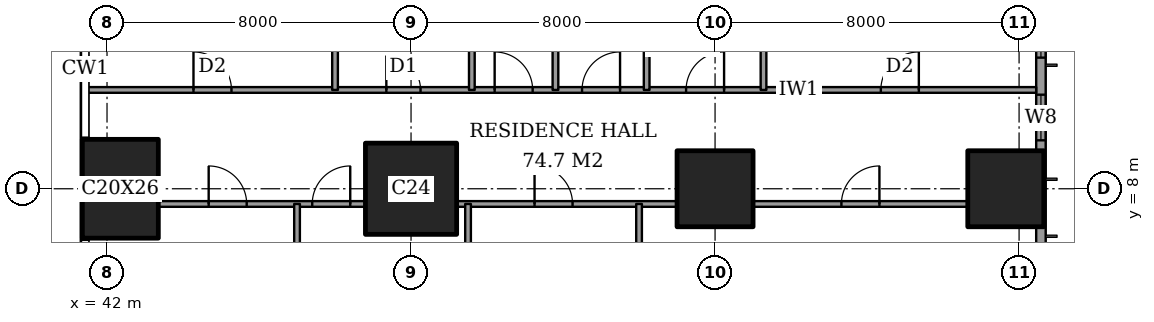
"""IFC4 building model, lengths in metres.
Left out: names, types, materials, properties, quantities, classifications, styles, units other than length and angle.
Written with IfcOpenShell. Run it as: python <this file> out.ifc"""

import sys

from ifc_helpers import new_model, si_unit, direction, frame, frame_2d, origin, origin_2d, place, context, subcontext, project, spatial, rectangle, extrude, element, fill, save


model = new_model("IFC4")
c1 = context("Model", 3, precision=1e-05, world=origin(), true_north=direction((0.0, 1.0)))
c2 = subcontext(c1, "Body", "Model", "MODEL_VIEW")
j1 = project(units=[si_unit("LENGTHUNIT", "METRE"), si_unit("PLANEANGLEUNIT", "RADIAN")], contexts=[c1])
p1 = place(None, origin())
s1 = spatial("IfcSite", under=j1, at=p1, CompositionType="ELEMENT")
p2 = place(p1, origin())
s2 = spatial("IfcBuilding", under=s1, at=p2, CompositionType="ELEMENT")
p3 = place(p2, frame((0.0, 0.0, 40.4)))
s3 = spatial("IfcBuildingStorey", under=s2, at=p3, CompositionType="ELEMENT", Elevation=40.4)
p4 = place(p3, frame((42.35, 8.0, 0.0), z_axis=(0.0, 0.0, 1.0), x_axis=(1.0, 0.0, 0.0)))
e1 = element("IfcColumn", 1, at=p4, inside=s3, PredefinedType="COLUMN", context=c2, shape_type="SweptSolid", body=[
    extrude(rectangle(XDim=2.0, YDim=2.6, at=origin_2d()), origin(), (0.0, 0.0, 1.0), 3.6),
])
p5 = place(p3, frame((50.0, 8.0, 0.0), z_axis=(0.0, 0.0, 1.0), x_axis=(1.0, 0.0, 0.0)))
e2 = element("IfcColumn", 2, at=p5, inside=s3, PredefinedType="COLUMN", context=c2, shape_type="SweptSolid", body=[
    extrude(rectangle(XDim=2.4, YDim=2.4, at=origin_2d()), origin(), (0.0, 0.0, 1.0), 3.6),
])
for number, where, z_axis, x_axis in (
    (3, (58.0, 8.0, 0.0), (0.0, 0.0, 1.0), (1.0, 0.0, 0.0)),
    (4, (65.65, 8.0, 0.0), (0.0, 0.0, 1.0), (1.0, 0.0, 0.0)),
):
    element("IfcColumn", number, at=place(p3, frame(where, z_axis=z_axis, x_axis=x_axis)), inside=s3, PredefinedType="COLUMN", context=c2, shape_type="SweptSolid", body=[
        extrude(rectangle(XDim=2.0, YDim=2.0, at=origin_2d()), origin(), (0.0, 0.0, 1.0), 3.6),
    ])
p6 = place(p3, frame((66.575, 3.175, 0.0), z_axis=(0.0, 0.0, 1.0), x_axis=(0.0, 1.0, 0.0)))
e5 = element("IfcWall", 5, at=p6, inside=s3, PredefinedType="SOLIDWALL", context=c2, shape_type="SweptSolid", body=[
    extrude(rectangle(XDim=41.65, YDim=0.25, at=frame_2d((20.825, 0.0))), origin(), (0.0, 0.0, 1.0), 3.6),
])
p7 = place(p6, frame((0.775, 0.0, 0.6)))
e6 = element("IfcOpeningElement", 6, at=p7, cuts=e5, PredefinedType="OPENING", context=c2, shape_type="SweptSolid", body=[
    extrude(rectangle(XDim=2.4, YDim=2.0, at=frame_2d((1.2, 1.0))), frame((0.0, 0.135, 0.0), z_axis=(0.0, -1.0, 0.0), x_axis=(1.0, 0.0, 0.0)), (0.0, 0.0, 1.0), 0.27),
])
p8 = place(p6, frame((6.1, 0.0, 0.6)))
e7 = element("IfcOpeningElement", 7, at=p8, cuts=e5, PredefinedType="OPENING", context=c2, shape_type="SweptSolid", body=[
    extrude(rectangle(XDim=1.2, YDim=2.0, at=frame_2d((0.6, 1.0))), frame((0.0, 0.135, 0.0), z_axis=(0.0, -1.0, 0.0), x_axis=(1.0, 0.0, 0.0)), (0.0, 0.0, 1.0), 0.27),
])
p9 = place(p6, frame((8.275, 0.0, 0.6)))
e8 = element("IfcOpeningElement", 8, at=p9, cuts=e5, PredefinedType="OPENING", context=c2, shape_type="SweptSolid", body=[
    extrude(rectangle(XDim=2.4, YDim=2.0, at=frame_2d((1.2, 1.0))), frame((0.0, 0.135, 0.0), z_axis=(0.0, -1.0, 0.0), x_axis=(1.0, 0.0, 0.0)), (0.0, 0.0, 1.0), 0.27),
])
p10 = place(p6, frame((15.775, 0.0, 0.6)))
e9 = element("IfcOpeningElement", 9, at=p10, cuts=e5, PredefinedType="OPENING", context=c2, shape_type="SweptSolid", body=[
    extrude(rectangle(XDim=2.4, YDim=2.0, at=frame_2d((1.2, 1.0))), frame((0.0, 0.135, 0.0), z_axis=(0.0, -1.0, 0.0), x_axis=(1.0, 0.0, 0.0)), (0.0, 0.0, 1.0), 0.27),
])
p11 = place(p6, frame((23.475, 0.0, 0.6)))
e10 = element("IfcOpeningElement", 10, at=p11, cuts=e5, PredefinedType="OPENING", context=c2, shape_type="SweptSolid", body=[
    extrude(rectangle(XDim=2.4, YDim=2.0, at=frame_2d((1.2, 1.0))), frame((0.0, 0.135, 0.0), z_axis=(0.0, -1.0, 0.0), x_axis=(1.0, 0.0, 0.0)), (0.0, 0.0, 1.0), 0.27),
])
p12 = place(p6, frame((30.975, 0.0, 0.6)))
e11 = element("IfcOpeningElement", 11, at=p12, cuts=e5, PredefinedType="OPENING", context=c2, shape_type="SweptSolid", body=[
    extrude(rectangle(XDim=2.4, YDim=2.0, at=frame_2d((1.2, 1.0))), frame((0.0, 0.135, 0.0), z_axis=(0.0, -1.0, 0.0), x_axis=(1.0, 0.0, 0.0)), (0.0, 0.0, 1.0), 0.27),
])
p13 = place(p6, frame((34.5, 0.0, 0.6)))
e12 = element("IfcOpeningElement", 12, at=p13, cuts=e5, PredefinedType="OPENING", context=c2, shape_type="SweptSolid", body=[
    extrude(rectangle(XDim=1.2, YDim=2.0, at=frame_2d((0.6, 1.0))), frame((0.0, 0.135, 0.0), z_axis=(0.0, -1.0, 0.0), x_axis=(1.0, 0.0, 0.0)), (0.0, 0.0, 1.0), 0.27),
])
p14 = place(p6, frame((38.475, 0.0, 0.6)))
e13 = element("IfcOpeningElement", 13, at=p14, cuts=e5, PredefinedType="OPENING", context=c2, shape_type="SweptSolid", body=[
    extrude(rectangle(XDim=2.4, YDim=2.0, at=frame_2d((1.2, 1.0))), frame((0.0, 0.135, 0.0), z_axis=(0.0, -1.0, 0.0), x_axis=(1.0, 0.0, 0.0)), (0.0, 0.0, 1.0), 0.27),
])
p15 = place(p3, frame((43.35, 7.6, 0.0), z_axis=(0.0, 0.0, 1.0), x_axis=(1.0, 0.0, 0.0)))
e14 = element("IfcWall", 14, at=p15, inside=s3, PredefinedType="PARTITIONING", context=c2, shape_type="SweptSolid", body=[
    extrude(rectangle(XDim=5.45, YDim=0.15, at=frame_2d((2.725, 0.0))), origin(), (0.0, 0.0, 1.0), 3.35),
])
p16 = place(p15, frame((4.05, 0.0, 0.0)))
e15 = element("IfcOpeningElement", 15, at=p16, cuts=e14, PredefinedType="OPENING", context=c2, shape_type="SweptSolid", body=[
    extrude(rectangle(XDim=1.0, YDim=2.1, at=frame_2d((0.5, 1.05))), frame((0.0, 0.085, 0.0), z_axis=(0.0, -1.0, 0.0), x_axis=(1.0, 0.0, 0.0)), (0.0, 0.0, 1.0), 0.17),
])
p17 = place(p15, frame((1.325, 0.0, 0.0)))
e16 = element("IfcOpeningElement", 16, at=p17, cuts=e14, PredefinedType="OPENING", context=c2, shape_type="SweptSolid", body=[
    extrude(rectangle(XDim=1.0, YDim=2.1, at=frame_2d((0.5, 1.05))), frame((0.0, 0.085, 0.0), z_axis=(0.0, -1.0, 0.0), x_axis=(1.0, 0.0, 0.0)), (0.0, 0.0, 1.0), 0.17),
])
p18 = place(p3, frame((51.2, 7.6, 0.0), z_axis=(0.0, 0.0, 1.0), x_axis=(1.0, 0.0, 0.0)))
e17 = element("IfcWall", 17, at=p18, inside=s3, PredefinedType="PARTITIONING", context=c2, shape_type="SweptSolid", body=[
    extrude(rectangle(XDim=5.8, YDim=0.15, at=frame_2d((2.9, 0.0))), origin(), (0.0, 0.0, 1.0), 3.35),
])
p19 = place(p18, frame((2.05, 0.0, 0.0)))
e18 = element("IfcOpeningElement", 18, at=p19, cuts=e17, PredefinedType="OPENING", context=c2, shape_type="SweptSolid", body=[
    extrude(rectangle(XDim=1.0, YDim=2.1, at=frame_2d((0.5, 1.05))), frame((0.0, 0.085, 0.0), z_axis=(0.0, -1.0, 0.0), x_axis=(1.0, 0.0, 0.0)), (0.0, 0.0, 1.0), 0.17),
])
p20 = place(p3, frame((59.0, 7.6, 0.0), z_axis=(0.0, 0.0, 1.0), x_axis=(1.0, 0.0, 0.0)))
e19 = element("IfcWall", 19, at=p20, inside=s3, PredefinedType="PARTITIONING", context=c2, shape_type="SweptSolid", body=[
    extrude(rectangle(XDim=5.65, YDim=0.15, at=frame_2d((2.825, 0.0))), origin(), (0.0, 0.0, 1.0), 3.35),
])
p21 = place(p20, frame((2.325, 0.0, 0.0)))
e20 = element("IfcOpeningElement", 20, at=p21, cuts=e19, PredefinedType="OPENING", context=c2, shape_type="SweptSolid", body=[
    extrude(rectangle(XDim=1.0, YDim=2.1, at=frame_2d((0.5, 1.05))), frame((0.0, 0.085, 0.0), z_axis=(0.0, -1.0, 0.0), x_axis=(1.0, 0.0, 0.0)), (0.0, 0.0, 1.0), 0.17),
])
p22 = place(p3, frame((41.439, 10.6, 0.0), z_axis=(0.0, 0.0, 1.0), x_axis=(1.0, 0.0, 0.0)))
e21 = element("IfcWall", 21, at=p22, inside=s3, PredefinedType="PARTITIONING", context=c2, shape_type="SweptSolid", body=[
    extrude(rectangle(XDim=25.011, YDim=0.15, at=frame_2d((12.505, 0.0))), origin(), (0.0, 0.0, 1.0), 3.35),
])
p23 = place(p22, frame((10.761, 0.0, 0.0)))
e22 = element("IfcOpeningElement", 22, at=p23, cuts=e21, PredefinedType="OPENING", context=c2, shape_type="SweptSolid", body=[
    extrude(rectangle(XDim=1.0, YDim=2.1, at=frame_2d((0.5, 1.05))), frame((0.0, 0.085, 0.0), z_axis=(0.0, -1.0, 0.0), x_axis=(1.0, 0.0, 0.0)), (0.0, 0.0, 1.0), 0.17),
])
p24 = place(p22, frame((20.924, 0.0, 0.0)))
e23 = element("IfcOpeningElement", 23, at=p24, cuts=e21, PredefinedType="OPENING", context=c2, shape_type="SweptSolid", body=[
    extrude(rectangle(XDim=1.0, YDim=2.1, at=frame_2d((0.5, 1.05))), frame((0.0, 0.085, 0.0), z_axis=(0.0, -1.0, 0.0), x_axis=(1.0, 0.0, 0.0)), (0.0, 0.0, 1.0), 0.17),
])
p25 = place(p22, frame((15.799, 0.0, 0.0)))
e24 = element("IfcOpeningElement", 24, at=p25, cuts=e21, PredefinedType="OPENING", context=c2, shape_type="SweptSolid", body=[
    extrude(rectangle(XDim=1.0, YDim=2.1, at=frame_2d((0.5, 1.05))), frame((0.0, 0.085, 0.0), z_axis=(0.0, -1.0, 0.0), x_axis=(1.0, 0.0, 0.0)), (0.0, 0.0, 1.0), 0.17),
])
p26 = place(p22, frame((13.061, 0.0, 0.0)))
e25 = element("IfcOpeningElement", 25, at=p26, cuts=e21, PredefinedType="OPENING", context=c2, shape_type="SweptSolid", body=[
    extrude(rectangle(XDim=1.0, YDim=2.1, at=frame_2d((0.5, 1.05))), frame((0.0, 0.085, 0.0), z_axis=(0.0, -1.0, 0.0), x_axis=(1.0, 0.0, 0.0)), (0.0, 0.0, 1.0), 0.17),
])
p27 = place(p22, frame((7.911, 0.0, 0.0)))
e26 = element("IfcOpeningElement", 26, at=p27, cuts=e21, PredefinedType="OPENING", context=c2, shape_type="SweptSolid", body=[
    extrude(rectangle(XDim=0.9, YDim=2.1, at=frame_2d((0.45, 1.05))), frame((0.0, 0.085, 0.0), z_axis=(0.0, -1.0, 0.0), x_axis=(1.0, 0.0, 0.0)), (0.0, 0.0, 1.0), 0.17),
])
p28 = place(p22, frame((2.836, 0.0, 0.0)))
e27 = element("IfcOpeningElement", 27, at=p28, cuts=e21, PredefinedType="OPENING", context=c2, shape_type="SweptSolid", body=[
    extrude(rectangle(XDim=1.0, YDim=2.1, at=frame_2d((0.5, 1.05))), frame((0.0, 0.085, 0.0), z_axis=(0.0, -1.0, 0.0), x_axis=(1.0, 0.0, 0.0)), (0.0, 0.0, 1.0), 0.17),
])
p29 = place(p3, frame((47.0, -0.45, 0.0), z_axis=(0.0, 0.0, 1.0), x_axis=(0.0, 1.0, 0.0)))
e28 = element("IfcWall", 28, at=p29, inside=s3, PredefinedType="PARTITIONING", context=c2, shape_type="SweptSolid", body=[
    extrude(rectangle(XDim=8.05, YDim=0.15, at=frame_2d((4.025, 0.0))), origin(), (0.0, 0.0, 1.0), 3.35),
])
p30 = place(p3, frame((48.0, 10.6, 0.0), z_axis=(0.0, 0.0, 1.0), x_axis=(0.0, 1.0, 0.0)))
e29 = element("IfcWall", 29, at=p30, inside=s3, PredefinedType="PARTITIONING", context=c2, shape_type="SweptSolid", body=[
    extrude(rectangle(XDim=13.4, YDim=0.15, at=frame_2d((6.7, 0.0))), origin(), (0.0, 0.0, 1.0), 3.35),
])
p31 = place(p30, frame((10.8, 0.0, 0.0)))
e30 = element("IfcOpeningElement", 30, at=p31, cuts=e29, PredefinedType="OPENING", context=c2, shape_type="SweptSolid", body=[
    extrude(rectangle(XDim=1.2, YDim=2.4, at=frame_2d((0.6, 1.2))), frame((0.0, 0.085, 0.0), z_axis=(0.0, -1.0, 0.0), x_axis=(1.0, 0.0, 0.0)), (0.0, 0.0, 1.0), 0.17),
])
p32 = place(p30, frame((6.7, 0.0, 0.0)))
e31 = element("IfcOpeningElement", 31, at=p32, cuts=e29, PredefinedType="OPENING", context=c2, shape_type="SweptSolid", body=[
    extrude(rectangle(XDim=0.9, YDim=2.1, at=frame_2d((0.45, 1.05))), frame((0.0, 0.085, 0.0), z_axis=(0.0, -1.0, 0.0), x_axis=(1.0, 0.0, 0.0)), (0.0, 0.0, 1.0), 0.17),
])
p33 = place(p3, frame((51.5, -0.45, 0.0), z_axis=(0.0, 0.0, 1.0), x_axis=(0.0, 1.0, 0.0)))
e32 = element("IfcWall", 32, at=p33, inside=s3, PredefinedType="PARTITIONING", context=c2, shape_type="SweptSolid", body=[
    extrude(rectangle(XDim=8.05, YDim=0.15, at=frame_2d((4.025, 0.0))), origin(), (0.0, 0.0, 1.0), 3.35),
])
for number, where, z_axis, x_axis in (
    (33, (51.6, 10.6, 0.0), (0.0, 0.0, 1.0), (0.0, 1.0, 0.0)),
    (34, (53.8, 10.6, 0.0), (0.0, 0.0, 1.0), (0.0, 1.0, 0.0)),
):
    element("IfcWall", number, at=place(p3, frame(where, z_axis=z_axis, x_axis=x_axis)), inside=s3, PredefinedType="PARTITIONING", context=c2, shape_type="SweptSolid", body=[
        extrude(rectangle(XDim=4.0, YDim=0.15, at=frame_2d((2.0, 0.0))), origin(), (0.0, 0.0, 1.0), 3.35),
    ])
p34 = place(p3, frame((56.0, -0.45, 0.0), z_axis=(0.0, 0.0, 1.0), x_axis=(0.0, 1.0, 0.0)))
e35 = element("IfcWall", 35, at=p34, inside=s3, PredefinedType="PARTITIONING", context=c2, shape_type="SweptSolid", body=[
    extrude(rectangle(XDim=8.05, YDim=0.15, at=frame_2d((4.025, 0.0))), origin(), (0.0, 0.0, 1.0), 3.35),
])
p35 = place(p3, frame((56.2, 10.6, 0.0), z_axis=(0.0, 0.0, 1.0), x_axis=(0.0, 1.0, 0.0)))
e36 = element("IfcWall", 36, at=p35, inside=s3, PredefinedType="PARTITIONING", context=c2, shape_type="SweptSolid", body=[
    extrude(rectangle(XDim=11.0, YDim=0.15, at=frame_2d((5.5, 0.0))), origin(), (0.0, 0.0, 1.0), 3.35),
])
p36 = place(p35, frame((7.0, 0.0, 0.0)))
e37 = element("IfcOpeningElement", 37, at=p36, cuts=e36, PredefinedType="OPENING", context=c2, shape_type="SweptSolid", body=[
    extrude(rectangle(XDim=1.0, YDim=2.1, at=frame_2d((0.5, 1.05))), frame((0.0, 0.085, 0.0), z_axis=(0.0, -1.0, 0.0), x_axis=(1.0, 0.0, 0.0)), (0.0, 0.0, 1.0), 0.17),
])
p37 = place(p3, frame((59.275, 10.6, 0.0), z_axis=(0.0, 0.0, 1.0), x_axis=(0.0, 1.0, 0.0)))
e38 = element("IfcWall", 38, at=p37, inside=s3, PredefinedType="PARTITIONING", context=c2, shape_type="SweptSolid", body=[
    extrude(rectangle(XDim=4.2, YDim=0.15, at=frame_2d((2.1, 0.0))), origin(), (0.0, 0.0, 1.0), 3.35),
])
p38 = place(p8, origin())
e39 = element("IfcWindow", 39, at=p38, inside=s3, PartitioningType="SINGLE_PANEL", PredefinedType="WINDOW", context=c2, shape_type="SweptSolid", body=[
    extrude(rectangle(XDim=1.2, YDim=2.0, at=frame_2d((0.6, 1.0))), frame((0.0, 0.03, 0.0), z_axis=(0.0, -1.0, 0.0), x_axis=(1.0, 0.0, 0.0)), (0.0, 0.0, 1.0), 0.06),
])
fill(e7, e39)
p39 = place(p9, origin())
e40 = element("IfcWindow", 40, at=p39, inside=s3, PartitioningType="SINGLE_PANEL", PredefinedType="WINDOW", context=c2, shape_type="SweptSolid", body=[
    extrude(rectangle(XDim=2.4, YDim=2.0, at=frame_2d((1.2, 1.0))), frame((0.0, 0.03, 0.0), z_axis=(0.0, -1.0, 0.0), x_axis=(1.0, 0.0, 0.0)), (0.0, 0.0, 1.0), 0.06),
])
fill(e8, e40)
p40 = place(p21, origin())
e41 = element("IfcDoor", 41, at=p40, inside=s3, OperationType="SINGLE_SWING_LEFT", PredefinedType="DOOR", context=c2, shape_type="SweptSolid", body=[
    extrude(rectangle(XDim=1.0, YDim=2.1, at=frame_2d((0.5, 1.05))), frame((0.0, 0.025, 0.0), z_axis=(0.0, -1.0, 0.0), x_axis=(1.0, 0.0, 0.0)), (0.0, 0.0, 1.0), 0.05),
])
fill(e20, e41)
p41 = place(p19, origin())
e42 = element("IfcDoor", 42, at=p41, inside=s3, OperationType="SINGLE_SWING_RIGHT", PredefinedType="DOOR", context=c2, shape_type="SweptSolid", body=[
    extrude(rectangle(XDim=1.0, YDim=2.1, at=frame_2d((0.5, 1.05))), frame((0.0, 0.025, 0.0), z_axis=(0.0, -1.0, 0.0), x_axis=(1.0, 0.0, 0.0)), (0.0, 0.0, 1.0), 0.05),
])
fill(e18, e42)
p42 = place(p16, origin())
e43 = element("IfcDoor", 43, at=p42, inside=s3, OperationType="SINGLE_SWING_LEFT", PredefinedType="DOOR", context=c2, shape_type="SweptSolid", body=[
    extrude(rectangle(XDim=1.0, YDim=2.1, at=frame_2d((0.5, 1.05))), frame((0.0, 0.025, 0.0), z_axis=(0.0, -1.0, 0.0), x_axis=(1.0, 0.0, 0.0)), (0.0, 0.0, 1.0), 0.05),
])
fill(e15, e43)
p43 = place(p17, origin())
e44 = element("IfcDoor", 44, at=p43, inside=s3, OperationType="SINGLE_SWING_RIGHT", PredefinedType="DOOR", context=c2, shape_type="SweptSolid", body=[
    extrude(rectangle(XDim=1.0, YDim=2.1, at=frame_2d((0.5, 1.05))), frame((0.0, 0.025, 0.0), z_axis=(0.0, -1.0, 0.0), x_axis=(1.0, 0.0, 0.0)), (0.0, 0.0, 1.0), 0.05),
])
fill(e16, e44)
p44 = place(p23, origin())
e45 = element("IfcDoor", 45, at=p44, inside=s3, OperationType="SINGLE_SWING_RIGHT", PredefinedType="DOOR", context=c2, shape_type="SweptSolid", body=[
    extrude(rectangle(XDim=1.0, YDim=2.1, at=frame_2d((0.5, 1.05))), frame((0.0, 0.025, 0.0), z_axis=(0.0, -1.0, 0.0), x_axis=(1.0, 0.0, 0.0)), (0.0, 0.0, 1.0), 0.05),
])
fill(e22, e45)
p45 = place(p24, origin())
e46 = element("IfcDoor", 46, at=p45, inside=s3, OperationType="SINGLE_SWING_LEFT", PredefinedType="DOOR", context=c2, shape_type="SweptSolid", body=[
    extrude(rectangle(XDim=1.0, YDim=2.1, at=frame_2d((0.5, 1.05))), frame((0.0, 0.025, 0.0), z_axis=(0.0, -1.0, 0.0), x_axis=(1.0, 0.0, 0.0)), (0.0, 0.0, 1.0), 0.05),
])
fill(e23, e46)
p46 = place(p25, origin())
e47 = element("IfcDoor", 47, at=p46, inside=s3, OperationType="SINGLE_SWING_LEFT", PredefinedType="DOOR", context=c2, shape_type="SweptSolid", body=[
    extrude(rectangle(XDim=1.0, YDim=2.1, at=frame_2d((0.5, 1.05))), frame((0.0, 0.025, 0.0), z_axis=(0.0, -1.0, 0.0), x_axis=(1.0, 0.0, 0.0)), (0.0, 0.0, 1.0), 0.05),
])
fill(e24, e47)
p47 = place(p26, origin())
e48 = element("IfcDoor", 48, at=p47, inside=s3, OperationType="SINGLE_SWING_LEFT", PredefinedType="DOOR", context=c2, shape_type="SweptSolid", body=[
    extrude(rectangle(XDim=1.0, YDim=2.1, at=frame_2d((0.5, 1.05))), frame((0.0, 0.025, 0.0), z_axis=(0.0, -1.0, 0.0), x_axis=(1.0, 0.0, 0.0)), (0.0, 0.0, 1.0), 0.05),
])
fill(e25, e48)
p48 = place(p27, origin())
e49 = element("IfcDoor", 49, at=p48, inside=s3, OperationType="SINGLE_SWING_RIGHT", PredefinedType="DOOR", context=c2, shape_type="SweptSolid", body=[
    extrude(rectangle(XDim=0.9, YDim=2.1, at=frame_2d((0.45, 1.05))), frame((0.0, 0.025, 0.0), z_axis=(0.0, -1.0, 0.0), x_axis=(1.0, 0.0, 0.0)), (0.0, 0.0, 1.0), 0.05),
])
fill(e26, e49)
p49 = place(p28, origin())
e50 = element("IfcDoor", 50, at=p49, inside=s3, OperationType="SINGLE_SWING_RIGHT", PredefinedType="DOOR", context=c2, shape_type="SweptSolid", body=[
    extrude(rectangle(XDim=1.0, YDim=2.1, at=frame_2d((0.5, 1.05))), frame((0.0, 0.025, 0.0), z_axis=(0.0, -1.0, 0.0), x_axis=(1.0, 0.0, 0.0)), (0.0, 0.0, 1.0), 0.05),
])
fill(e27, e50)
save(model, sys.argv[1])
